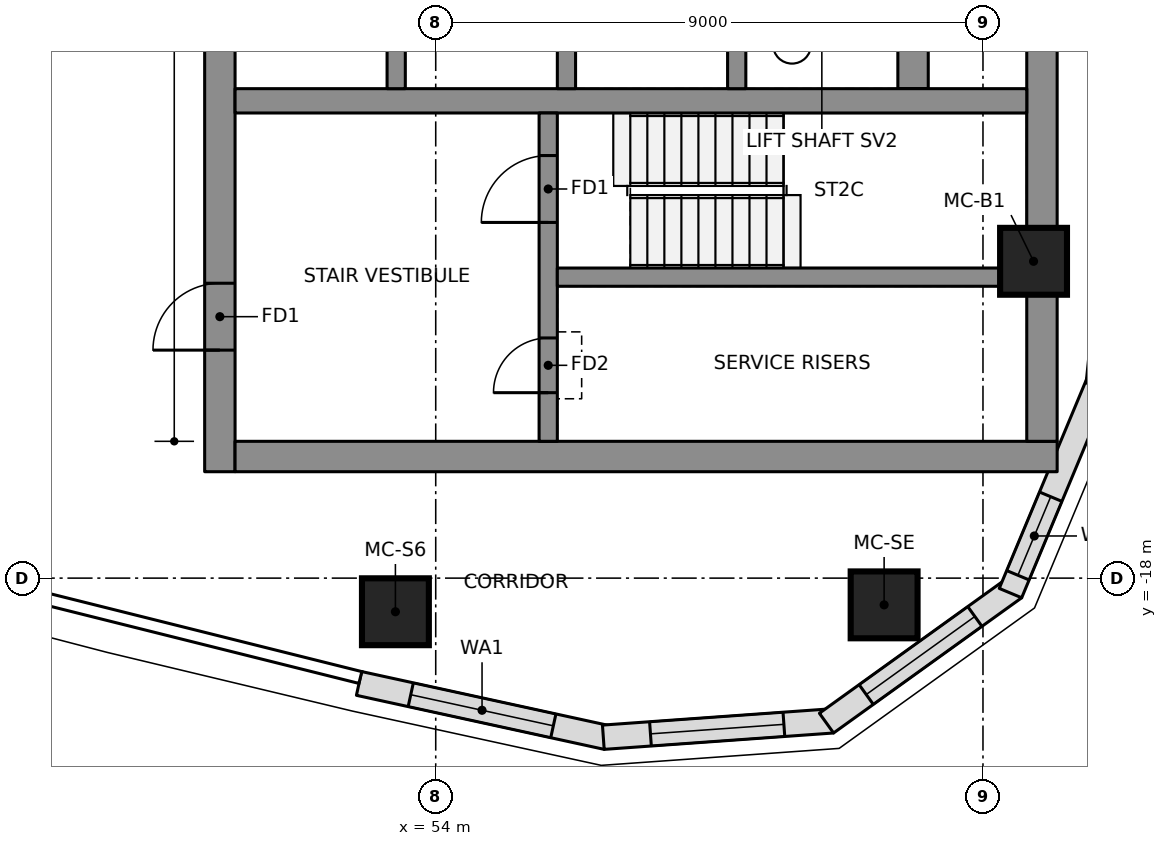
"""IFC4 building model, lengths in metres.
Left out: names, types, materials, properties, quantities, classifications, styles, units other than length and angle.
Written with IfcOpenShell. Run it as: python <this file> out.ifc"""

import sys

from ifc_helpers import new_model, si_unit, direction, frame, frame_2d, origin, origin_2d, place, context, subcontext, project, spatial, polyline, rectangle, outline, extrude, element, fill, save


model = new_model("IFC4")
c1 = context("Model", 3, precision=1e-05, world=origin(), true_north=direction((0.0, 1.0)))
c2 = subcontext(c1, "Body", "Model", "MODEL_VIEW")
j1 = project(units=[si_unit("LENGTHUNIT", "METRE"), si_unit("PLANEANGLEUNIT", "RADIAN")], contexts=[c1])
p1 = place(None, origin())
s1 = spatial("IfcSite", under=j1, at=p1, CompositionType="ELEMENT")
p2 = place(p1, origin())
s2 = spatial("IfcBuilding", under=s1, at=p2, CompositionType="ELEMENT")
p3 = place(p2, frame((0.0, 0.0, 275.0)))
s3 = spatial("IfcBuildingStorey", under=s2, at=p3, CompositionType="ELEMENT", Elevation=275.0)
p4 = place(p3, frame((50.45, -16.25, 0.0), z_axis=(0.0, 0.0, 1.0), x_axis=(0.0, 1.0, 0.0)))
e1 = element("IfcWall", 1, at=p4, inside=s3, PredefinedType="SHEAR", context=c2, shape_type="SweptSolid", body=[
    extrude(rectangle(XDim=9.6, YDim=0.5, at=frame_2d((4.8, 0.0))), origin(), (0.0, 0.0, 1.0), 3.55),
])
p5 = place(p4, frame((2.0, 0.0, 0.0)))
e2 = element("IfcOpeningElement", 2, at=p5, cuts=e1, PredefinedType="OPENING", context=c2, shape_type="SweptSolid", body=[
    extrude(rectangle(XDim=1.1, YDim=2.1, at=frame_2d((0.55, 1.05))), frame((0.0, 0.26, 0.0), z_axis=(0.0, -1.0, 0.0), x_axis=(1.0, 0.0, 0.0)), (0.0, 0.0, 1.0), 0.52),
])
p6 = place(p3, frame((50.7, -16.0, 0.0), z_axis=(0.0, 0.0, 1.0), x_axis=(1.0, 0.0, 0.0)))
e3 = element("IfcWall", 3, at=p6, inside=s3, PredefinedType="SHEAR", context=c2, shape_type="SweptSolid", body=[
    extrude(rectangle(XDim=13.52, YDim=0.5, at=frame_2d((6.76, 0.0))), origin(), (0.0, 0.0, 1.0), 3.55),
])
p7 = place(p3, frame((63.97, -15.75, 0.0), z_axis=(0.0, 0.0, 1.0), x_axis=(0.0, 1.0, 0.0)))
e4 = element("IfcWall", 4, at=p7, inside=s3, PredefinedType="SHEAR", context=c2, shape_type="SweptSolid", body=[
    extrude(rectangle(XDim=8.847, YDim=0.5, at=frame_2d((4.423, 0.0))), origin(), (0.0, 0.0, 1.0), 3.55),
])
p8 = place(p3, frame((61.85, -9.95, 0.0), z_axis=(0.0, 0.0, 1.0), x_axis=(0.0, 1.0, 0.0)))
e5 = element("IfcWall", 5, at=p8, inside=s3, PredefinedType="SHEAR", context=c2, shape_type="SweptSolid", body=[
    extrude(rectangle(XDim=19.9, YDim=0.5, at=frame_2d((9.95, 0.0))), origin(), (0.0, 0.0, 1.0), 3.55),
])
p9 = place(p3, frame((50.7, -10.15, 0.0), z_axis=(0.0, 0.0, 1.0), x_axis=(1.0, 0.0, 0.0)))
e6 = element("IfcWall", 6, at=p9, inside=s3, PredefinedType="SHEAR", context=c2, shape_type="SweptSolid", body=[
    extrude(rectangle(XDim=13.02, YDim=0.4, at=frame_2d((6.51, 0.0))), origin(), (0.0, 0.0, 1.0), 3.55),
])
for number, where, z_axis, x_axis in (
    (7, (53.35, -9.95, 0.0), (0.0, 0.0, 1.0), (0.0, 1.0, 0.0)),
    (8, (56.15, -9.95, 0.0), (0.0, 0.0, 1.0), (0.0, 1.0, 0.0)),
    (9, (58.95, -9.95, 0.0), (0.0, 0.0, 1.0), (0.0, 1.0, 0.0)),
):
    element("IfcWall", number, at=place(p3, frame(where, z_axis=z_axis, x_axis=x_axis)), inside=s3, PredefinedType="SHEAR", context=c2, shape_type="SweptSolid", body=[
        extrude(rectangle(XDim=3.0, YDim=0.3, at=frame_2d((1.5, 0.0))), origin(), (0.0, 0.0, 1.0), 3.55),
    ])
p10 = place(p3, frame((55.85, -15.75, 0.0), z_axis=(0.0, 0.0, 1.0), x_axis=(0.0, 1.0, 0.0)))
e10 = element("IfcWall", 10, at=p10, inside=s3, PredefinedType="SHEAR", context=c2, shape_type="SweptSolid", body=[
    extrude(rectangle(XDim=5.4, YDim=0.3, at=frame_2d((2.7, 0.0))), origin(), (0.0, 0.0, 1.0), 3.55),
])
p11 = place(p10, frame((3.6, 0.0, 0.0)))
e11 = element("IfcOpeningElement", 11, at=p11, cuts=e10, PredefinedType="OPENING", context=c2, shape_type="SweptSolid", body=[
    extrude(rectangle(XDim=1.1, YDim=2.1, at=frame_2d((0.55, 1.05))), frame((0.0, 0.16, 0.0), z_axis=(0.0, -1.0, 0.0), x_axis=(1.0, 0.0, 0.0)), (0.0, 0.0, 1.0), 0.32),
])
p12 = place(p10, frame((0.8, 0.0, 0.0)))
e12 = element("IfcOpeningElement", 12, at=p12, cuts=e10, PredefinedType="OPENING", context=c2, shape_type="SweptSolid", body=[
    extrude(rectangle(XDim=0.9, YDim=2.1, at=frame_2d((0.45, 1.05))), frame((0.0, 0.16, 0.0), z_axis=(0.0, -1.0, 0.0), x_axis=(1.0, 0.0, 0.0)), (0.0, 0.0, 1.0), 0.32),
])
p13 = place(p3, frame((56.0, -13.05, 0.0), z_axis=(0.0, 0.0, 1.0), x_axis=(1.0, 0.0, 0.0)))
e13 = element("IfcWall", 13, at=p13, inside=s3, PredefinedType="SHEAR", context=c2, shape_type="SweptSolid", body=[
    extrude(rectangle(XDim=7.72, YDim=0.3, at=frame_2d((3.86, 0.0))), origin(), (0.0, 0.0, 1.0), 3.55),
])
for number, where, z_axis, x_axis in (
    (14, (53.337, -18.553, 0.0), (0.0, 0.0, 1.0), (1.0, 0.0, 0.0)),
    (15, (61.374, -18.44, 0.0), (0.0, 0.0, 1.0), (1.0, 0.0, 0.0)),
    (16, (63.832, -12.789, 0.0), (0.0, 0.0, 1.0), (1.0, 0.0, 0.0)),
):
    element("IfcColumn", number, at=place(p3, frame(where, z_axis=z_axis, x_axis=x_axis)), inside=s3, PredefinedType="COLUMN", context=c2, shape_type="SweptSolid", body=[
        extrude(rectangle(XDim=1.1, YDim=1.1, at=origin_2d()), origin(), (0.0, 0.0, 1.0), 3.55),
    ])
p14 = place(p3, frame((52.738, -19.732, 0.0), z_axis=(0.0, 0.0, 1.0), x_axis=(0.977020225348, -0.213146614471, 0.0)))
e17 = element("IfcWall", 17, at=p14, inside=s3, PredefinedType="NOTDEFINED", context=c2, shape_type="SweptSolid", body=[
    extrude(outline(polyline([(0.0, -0.2), (4.171, -0.2), (4.113, 0.2), (0.0, 0.2), (0.0, -0.2)])), origin(), (0.0, 0.0, 1.0), 3.25),
])
p15 = place(p14, frame((0.871, 0.0, 0.5)))
e18 = element("IfcOpeningElement", 18, at=p15, cuts=e17, PredefinedType="OPENING", context=c2, shape_type="SweptSolid", body=[
    extrude(rectangle(XDim=2.4, YDim=2.0, at=frame_2d((1.2, 1.0))), frame((0.0, 0.21, 0.0), z_axis=(0.0, -1.0, 0.0), x_axis=(1.0, 0.0, 0.0)), (0.0, 0.0, 1.0), 0.42),
])
p16 = place(p3, frame((56.785, -20.615, 0.0), z_axis=(0.0, 0.0, 1.0), x_axis=(0.99746272096, 0.071190731806, 0.0)))
e19 = element("IfcWall", 19, at=p16, inside=s3, PredefinedType="NOTDEFINED", context=c2, shape_type="SweptSolid", body=[
    extrude(outline(polyline([(-0.029, -0.2), (3.753, -0.2), (3.64, 0.2), (0.029, 0.2), (-0.029, -0.2)])), origin(), (0.0, 0.0, 1.0), 3.25),
])
p17 = place(p16, frame((0.748, 0.0, 0.6)))
e20 = element("IfcOpeningElement", 20, at=p17, cuts=e19, PredefinedType="OPENING", context=c2, shape_type="SweptSolid", body=[
    extrude(outline(polyline([(0.0, 1.35), (0.084, 1.771), (0.322, 2.128), (0.679, 2.366), (1.1, 2.45), (1.521, 2.366), (1.878, 2.128), (2.116, 1.771), (2.2, 1.35), (2.2, 1.1), (2.116, 0.679), (1.878, 0.322), (1.521, 0.084), (1.1, 0.0), (0.679, 0.084), (0.322, 0.322), (0.084, 0.679), (0.0, 1.1), (0.0, 1.35)])), frame((0.0, 0.21, 0.0), z_axis=(0.0, -1.0, 0.0), x_axis=(1.0, 0.0, 0.0)), (0.0, 0.0, 1.0), 0.42),
])
p18 = place(p3, frame((60.472, -20.352, 0.0), z_axis=(0.0, 0.0, 1.0), x_axis=(0.811962548682, 0.583709533533, 0.0)))
e21 = element("IfcWall", 21, at=p18, inside=s3, PredefinedType="NOTDEFINED", context=c2, shape_type="SweptSolid", body=[
    extrude(outline(polyline([(-0.057, -0.2), (3.753, -0.2), (3.64, 0.2), (0.057, 0.2), (-0.057, -0.2)])), origin(), (0.0, 0.0, 1.0), 3.25),
])
p19 = place(p18, frame((0.748, 0.0, 0.6)))
e22 = element("IfcOpeningElement", 22, at=p19, cuts=e21, PredefinedType="OPENING", context=c2, shape_type="SweptSolid", body=[
    extrude(outline(polyline([(0.0, 1.35), (0.084, 1.771), (0.322, 2.128), (0.679, 2.366), (1.1, 2.45), (1.521, 2.366), (1.878, 2.128), (2.116, 1.771), (2.2, 1.35), (2.2, 1.1), (2.116, 0.679), (1.878, 0.322), (1.521, 0.084), (1.1, 0.0), (0.679, 0.084), (0.322, 0.322), (0.084, 0.679), (0.0, 1.1), (0.0, 1.35)])), frame((0.0, 0.21, 0.0), z_axis=(0.0, -1.0, 0.0), x_axis=(1.0, 0.0, 0.0)), (0.0, 0.0, 1.0), 0.42),
])
p20 = place(p3, frame((63.474, -18.194, 0.0), z_axis=(0.0, 0.0, 1.0), x_axis=(0.385285857918, 0.922797273343, 0.0)))
e23 = element("IfcWall", 23, at=p20, inside=s3, PredefinedType="NOTDEFINED", context=c2, shape_type="SweptSolid", body=[
    extrude(outline(polyline([(-0.057, -0.2), (3.726, -0.2), (3.667, 0.2), (0.057, 0.2), (-0.057, -0.2)])), origin(), (0.0, 0.0, 1.0), 3.25),
])
p21 = place(p20, frame((0.261, 0.0, 0.6)))
e24 = element("IfcOpeningElement", 24, at=p21, cuts=e23, PredefinedType="OPENING", context=c2, shape_type="SweptSolid", body=[
    extrude(outline(polyline([(0.0, 1.75), (0.053, 2.018), (0.205, 2.245), (0.432, 2.397), (0.7, 2.45), (0.968, 2.397), (1.195, 2.245), (1.347, 2.018), (1.4, 1.75), (1.4, 0.7), (1.347, 0.432), (1.195, 0.205), (0.968, 0.053), (0.7, 0.0), (0.432, 0.053), (0.205, 0.205), (0.053, 0.432), (0.0, 0.7), (0.0, 1.75)])), frame((0.0, 0.21, 0.0), z_axis=(0.0, -1.0, 0.0), x_axis=(1.0, 0.0, 0.0)), (0.0, 0.0, 1.0), 0.42),
])
p22 = place(p3, frame((64.898, -14.782, 0.0), z_axis=(0.0, 0.0, 1.0), x_axis=(0.102249826987, 0.994758751096, 0.0)))
e25 = element("IfcWall", 25, at=p22, inside=s3, PredefinedType="NOTDEFINED", context=c2, shape_type="SweptSolid", body=[
    extrude(outline(polyline([(-0.03, -0.2), (4.237, -0.2), (4.23, 0.2), (0.03, 0.2), (-0.03, -0.2)])), origin(), (0.0, 0.0, 1.0), 3.25),
])
p23 = place(p22, frame((1.417, 0.0, 0.5)))
e26 = element("IfcOpeningElement", 26, at=p23, cuts=e25, PredefinedType="OPENING", context=c2, shape_type="SweptSolid", body=[
    extrude(rectangle(XDim=2.4, YDim=2.0, at=frame_2d((1.2, 1.0))), frame((0.0, 0.21, 0.0), z_axis=(0.0, -1.0, 0.0), x_axis=(1.0, 0.0, 0.0)), (0.0, 0.0, 1.0), 0.42),
])
p24 = place(p15, origin())
e27 = element("IfcWindow", 27, at=p24, inside=s3, PartitioningType="SINGLE_PANEL", PredefinedType="WINDOW", context=c2, shape_type="SweptSolid", body=[
    extrude(rectangle(XDim=2.4, YDim=2.0, at=frame_2d((1.2, 1.0))), frame((0.0, 0.17, 0.0), z_axis=(0.0, -1.0, 0.0), x_axis=(1.0, 0.0, 0.0)), (0.0, 0.0, 1.0), 0.06),
])
fill(e18, e27)
p25 = place(p17, origin())
e28 = element("IfcWindow", 28, at=p25, inside=s3, PartitioningType="SINGLE_PANEL", PredefinedType="WINDOW", context=c2, shape_type="SweptSolid", body=[
    extrude(outline(polyline([(0.0, 1.35), (0.084, 1.771), (0.322, 2.128), (0.679, 2.366), (1.1, 2.45), (1.521, 2.366), (1.878, 2.128), (2.116, 1.771), (2.2, 1.35), (2.2, 1.1), (2.116, 0.679), (1.878, 0.322), (1.521, 0.084), (1.1, 0.0), (0.679, 0.084), (0.322, 0.322), (0.084, 0.679), (0.0, 1.1), (0.0, 1.35)])), frame((0.0, 0.17, 0.0), z_axis=(0.0, -1.0, 0.0), x_axis=(1.0, 0.0, 0.0)), (0.0, 0.0, 1.0), 0.06),
])
fill(e20, e28)
p26 = place(p19, origin())
e29 = element("IfcWindow", 29, at=p26, inside=s3, PartitioningType="SINGLE_PANEL", PredefinedType="WINDOW", context=c2, shape_type="SweptSolid", body=[
    extrude(outline(polyline([(0.0, 1.35), (0.084, 1.771), (0.322, 2.128), (0.679, 2.366), (1.1, 2.45), (1.521, 2.366), (1.878, 2.128), (2.116, 1.771), (2.2, 1.35), (2.2, 1.1), (2.116, 0.679), (1.878, 0.322), (1.521, 0.084), (1.1, 0.0), (0.679, 0.084), (0.322, 0.322), (0.084, 0.679), (0.0, 1.1), (0.0, 1.35)])), frame((0.0, 0.17, 0.0), z_axis=(0.0, -1.0, 0.0), x_axis=(1.0, 0.0, 0.0)), (0.0, 0.0, 1.0), 0.06),
])
fill(e22, e29)
p27 = place(p21, origin())
e30 = element("IfcWindow", 30, at=p27, inside=s3, PartitioningType="SINGLE_PANEL", PredefinedType="WINDOW", context=c2, shape_type="SweptSolid", body=[
    extrude(outline(polyline([(0.0, 1.75), (0.053, 2.018), (0.205, 2.245), (0.432, 2.397), (0.7, 2.45), (0.968, 2.397), (1.195, 2.245), (1.347, 2.018), (1.4, 1.75), (1.4, 0.7), (1.347, 0.432), (1.195, 0.205), (0.968, 0.053), (0.7, 0.0), (0.432, 0.053), (0.205, 0.205), (0.053, 0.432), (0.0, 0.7), (0.0, 1.75)])), frame((0.0, 0.17, 0.0), z_axis=(0.0, -1.0, 0.0), x_axis=(1.0, 0.0, 0.0)), (0.0, 0.0, 1.0), 0.06),
])
fill(e24, e30)
p28 = place(p11, origin())
e31 = element("IfcDoor", 31, at=p28, inside=s3, OperationType="SINGLE_SWING_RIGHT", PredefinedType="DOOR", context=c2, shape_type="SweptSolid", body=[
    extrude(rectangle(XDim=1.1, YDim=2.1, at=frame_2d((0.55, 1.05))), frame((0.0, 0.025, 0.0), z_axis=(0.0, -1.0, 0.0), x_axis=(1.0, 0.0, 0.0)), (0.0, 0.0, 1.0), 0.05),
])
fill(e11, e31)
p29 = place(p5, origin())
e32 = element("IfcDoor", 32, at=p29, inside=s3, OperationType="SINGLE_SWING_RIGHT", PredefinedType="DOOR", context=c2, shape_type="SweptSolid", body=[
    extrude(rectangle(XDim=1.1, YDim=2.1, at=frame_2d((0.55, 1.05))), frame((0.0, 0.025, 0.0), z_axis=(0.0, -1.0, 0.0), x_axis=(1.0, 0.0, 0.0)), (0.0, 0.0, 1.0), 0.05),
])
fill(e2, e32)
p30 = place(p12, origin())
e33 = element("IfcDoor", 33, at=p30, inside=s3, OperationType="SINGLE_SWING_LEFT", PredefinedType="DOOR", context=c2, shape_type="SweptSolid", body=[
    extrude(rectangle(XDim=0.9, YDim=2.1, at=frame_2d((0.45, 1.05))), frame((0.0, 0.025, 0.0), z_axis=(0.0, -1.0, 0.0), x_axis=(1.0, 0.0, 0.0)), (0.0, 0.0, 1.0), 0.05),
])
fill(e12, e33)
save(model, sys.argv[1])
